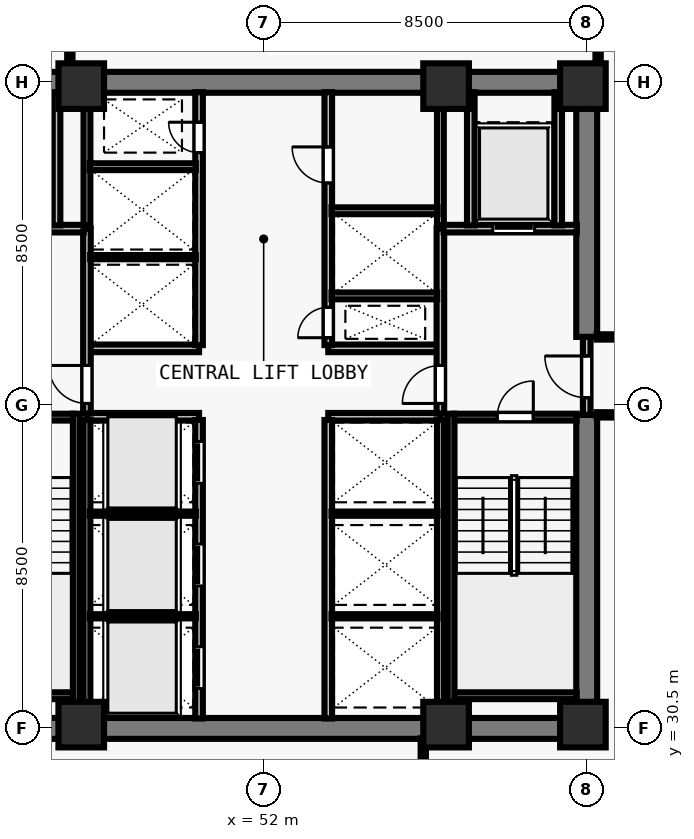
"""IFC4 building model, lengths in metres.
Left out: names, types, materials, properties, quantities, classifications, styles, units other than length and angle.
Written with IfcOpenShell. Run it as: python <this file> out.ifc"""

import sys

from ifc_helpers import new_model, si_unit, direction, frame, frame_2d, origin, origin_2d, place, context, subcontext, project, spatial, rectangle, extrude, element, fill, save


model = new_model("IFC4")
c1 = context("Model", 3, precision=1e-05, world=origin(), true_north=direction((0.0, 1.0)))
c2 = subcontext(c1, "Body", "Model", "MODEL_VIEW")
j1 = project(units=[si_unit("LENGTHUNIT", "METRE"), si_unit("PLANEANGLEUNIT", "RADIAN")], contexts=[c1])
p1 = place(None, origin())
s1 = spatial("IfcSite", under=j1, at=p1, CompositionType="ELEMENT")
p2 = place(p1, origin())
s2 = spatial("IfcBuilding", under=s1, at=p2, CompositionType="ELEMENT")
p3 = place(p2, frame((0.0, 0.0, 51.5)))
s3 = spatial("IfcBuildingStorey", under=s2, at=p3, CompositionType="ELEMENT", Elevation=51.5)
for number, where, z_axis, x_axis in (
    (1, (47.2, 30.6, 0.0), (0.0, 0.0, 1.0), (1.0, 0.0, 0.0)),
    (2, (56.8, 30.6, 0.0), (0.0, 0.0, 1.0), (1.0, 0.0, 0.0)),
    (3, (60.4, 30.6, 0.0), (0.0, 0.0, 1.0), (1.0, 0.0, 0.0)),
    (4, (47.2, 47.4, 0.0), (0.0, 0.0, 1.0), (1.0, 0.0, 0.0)),
    (5, (56.8, 47.4, 0.0), (0.0, 0.0, 1.0), (1.0, 0.0, 0.0)),
    (6, (60.4, 47.4, 0.0), (0.0, 0.0, 1.0), (1.0, 0.0, 0.0)),
):
    element("IfcColumn", number, at=place(p3, frame(where, z_axis=z_axis, x_axis=x_axis)), inside=s3, PredefinedType="COLUMN", context=c2, shape_type="SweptSolid", body=[
        extrude(rectangle(XDim=1.2, YDim=1.2, at=origin_2d()), origin(), (0.0, 0.0, 1.0), 3.5),
    ])
for number, where, z_axis, x_axis in (
    (7, (43.225, 30.5, 0.0), (0.0, 0.0, 1.0), (1.0, 0.0, 0.0)),
    (8, (43.225, 47.5, 0.0), (0.0, 0.0, 1.0), (1.0, 0.0, 0.0)),
):
    element("IfcWall", number, at=place(p3, frame(where, z_axis=z_axis, x_axis=x_axis)), inside=s3, PredefinedType="SHEAR", context=c2, shape_type="SweptSolid", body=[
        extrude(rectangle(XDim=17.55, YDim=0.55, at=frame_2d((8.775, 0.0))), origin(), (0.0, 0.0, 1.0), 3.28),
    ])
p4 = place(p3, frame((60.5, 30.765, 0.0), z_axis=(0.0, 0.0, 1.0), x_axis=(0.0, 1.0, 0.0)))
e9 = element("IfcWall", 9, at=p4, inside=s3, PredefinedType="SHEAR", context=c2, shape_type="SweptSolid", body=[
    extrude(rectangle(XDim=7.985, YDim=0.55, at=frame_2d((3.993, 0.0))), origin(), (0.0, 0.0, 1.0), 3.28),
])
p5 = place(p3, frame((60.5, 40.8, 0.0), z_axis=(0.0, 0.0, 1.0), x_axis=(0.0, 1.0, 0.0)))
e10 = element("IfcWall", 10, at=p5, inside=s3, PredefinedType="SHEAR", context=c2, shape_type="SweptSolid", body=[
    extrude(rectangle(XDim=6.435, YDim=0.55, at=frame_2d((3.218, 0.0))), origin(), (0.0, 0.0, 1.0), 3.28),
])
for number, where, z_axis, x_axis in (
    (11, (47.35, 38.7, 0.0), (0.0, 0.0, 1.0), (1.0, 0.0, 0.0)),
    (12, (47.35, 40.5, 0.0), (0.0, 0.0, 1.0), (1.0, 0.0, 0.0)),
    (13, (53.7, 38.7, 0.0), (0.0, 0.0, 1.0), (1.0, 0.0, 0.0)),
    (14, (53.7, 40.5, 0.0), (0.0, 0.0, 1.0), (1.0, 0.0, 0.0)),
):
    element("IfcWall", number, at=place(p3, frame(where, z_axis=z_axis, x_axis=x_axis)), inside=s3, PredefinedType="SOLIDWALL", context=c2, shape_type="SweptSolid", body=[
        extrude(rectangle(XDim=2.95, YDim=0.2, at=frame_2d((1.475, 0.0))), origin(), (0.0, 0.0, 1.0), 3.28),
    ])
p6 = place(p3, frame((50.3, 30.76, 0.0), z_axis=(0.0, 0.0, 1.0), x_axis=(0.0, 1.0, 0.0)))
e15 = element("IfcWall", 15, at=p6, inside=s3, PredefinedType="SOLIDWALL", context=c2, shape_type="SweptSolid", body=[
    extrude(rectangle(XDim=7.855, YDim=0.2, at=frame_2d((3.927, 0.0))), origin(), (0.0, 0.0, 1.0), 3.28),
])
p7 = place(p6, frame((0.79, 0.0, 0.0)))
e16 = element("IfcOpeningElement", 16, at=p7, cuts=e15, PredefinedType="OPENING", context=c2, shape_type="SweptSolid", body=[
    extrude(rectangle(XDim=1.1, YDim=2.2, at=frame_2d((0.55, 1.1))), frame((0.0, 0.11, 0.0), z_axis=(0.0, -1.0, 0.0), x_axis=(1.0, 0.0, 0.0)), (0.0, 0.0, 1.0), 0.22),
])
p8 = place(p6, frame((3.49, 0.0, 0.0)))
e17 = element("IfcOpeningElement", 17, at=p8, cuts=e15, PredefinedType="OPENING", context=c2, shape_type="SweptSolid", body=[
    extrude(rectangle(XDim=1.1, YDim=2.2, at=frame_2d((0.55, 1.1))), frame((0.0, 0.11, 0.0), z_axis=(0.0, -1.0, 0.0), x_axis=(1.0, 0.0, 0.0)), (0.0, 0.0, 1.0), 0.22),
])
p9 = place(p6, frame((6.19, 0.0, 0.0)))
e18 = element("IfcOpeningElement", 18, at=p9, cuts=e15, PredefinedType="OPENING", context=c2, shape_type="SweptSolid", body=[
    extrude(rectangle(XDim=1.1, YDim=2.2, at=frame_2d((0.55, 1.1))), frame((0.0, 0.11, 0.0), z_axis=(0.0, -1.0, 0.0), x_axis=(1.0, 0.0, 0.0)), (0.0, 0.0, 1.0), 0.22),
])
p10 = place(p3, frame((53.7, 30.76, 0.0), z_axis=(0.0, 0.0, 1.0), x_axis=(0.0, 1.0, 0.0)))
e19 = element("IfcWall", 19, at=p10, inside=s3, PredefinedType="SOLIDWALL", context=c2, shape_type="SweptSolid", body=[
    extrude(rectangle(XDim=7.855, YDim=0.2, at=frame_2d((3.927, 0.0))), origin(), (0.0, 0.0, 1.0), 3.28),
])
p11 = place(p3, frame((50.3, 40.585, 0.0), z_axis=(0.0, 0.0, 1.0), x_axis=(0.0, 1.0, 0.0)))
e20 = element("IfcWall", 20, at=p11, inside=s3, PredefinedType="SOLIDWALL", context=c2, shape_type="SweptSolid", body=[
    extrude(rectangle(XDim=6.655, YDim=0.2, at=frame_2d((3.328, 0.0))), origin(), (0.0, 0.0, 1.0), 3.28),
])
p12 = place(p11, frame((5.065, 0.0, 0.0)))
e21 = element("IfcOpeningElement", 21, at=p12, cuts=e20, PredefinedType="OPENING", context=c2, shape_type="SweptSolid", body=[
    extrude(rectangle(XDim=0.8, YDim=2.08, at=frame_2d((0.4, 1.04))), frame((0.0, 0.11, 0.0), z_axis=(0.0, -1.0, 0.0), x_axis=(1.0, 0.0, 0.0)), (0.0, 0.0, 1.0), 0.22),
])
p13 = place(p3, frame((53.7, 40.585, 0.0), z_axis=(0.0, 0.0, 1.0), x_axis=(0.0, 1.0, 0.0)))
e22 = element("IfcWall", 22, at=p13, inside=s3, PredefinedType="SOLIDWALL", context=c2, shape_type="SweptSolid", body=[
    extrude(rectangle(XDim=6.655, YDim=0.2, at=frame_2d((3.328, 0.0))), origin(), (0.0, 0.0, 1.0), 3.28),
])
p14 = place(p13, frame((0.195, 0.0, 0.0)))
e23 = element("IfcOpeningElement", 23, at=p14, cuts=e22, PredefinedType="OPENING", context=c2, shape_type="SweptSolid", body=[
    extrude(rectangle(XDim=0.8, YDim=2.08, at=frame_2d((0.4, 1.04))), frame((0.0, 0.11, 0.0), z_axis=(0.0, -1.0, 0.0), x_axis=(1.0, 0.0, 0.0)), (0.0, 0.0, 1.0), 0.22),
])
p15 = place(p13, frame((4.265, 0.0, 0.0)))
e24 = element("IfcOpeningElement", 24, at=p15, cuts=e22, PredefinedType="OPENING", context=c2, shape_type="SweptSolid", body=[
    extrude(rectangle(XDim=0.95, YDim=2.12, at=frame_2d((0.475, 1.06))), frame((0.0, 0.11, 0.0), z_axis=(0.0, -1.0, 0.0), x_axis=(1.0, 0.0, 0.0)), (0.0, 0.0, 1.0), 0.22),
])
p16 = place(p3, frame((47.35, 38.785, 0.0), z_axis=(0.0, 0.0, 1.0), x_axis=(0.0, 1.0, 0.0)))
e25 = element("IfcWall", 25, at=p16, inside=s3, PredefinedType="SOLIDWALL", context=c2, shape_type="SweptSolid", body=[
    extrude(rectangle(XDim=4.865, YDim=0.2, at=frame_2d((2.433, 0.0))), origin(), (0.0, 0.0, 1.0), 3.28),
])
p17 = place(p16, frame((0.265, 0.0, 0.0)))
e26 = element("IfcOpeningElement", 26, at=p17, cuts=e25, PredefinedType="OPENING", context=c2, shape_type="SweptSolid", body=[
    extrude(rectangle(XDim=1.0, YDim=2.15, at=frame_2d((0.5, 1.075))), frame((0.0, 0.11, 0.0), z_axis=(0.0, -1.0, 0.0), x_axis=(1.0, 0.0, 0.0)), (0.0, 0.0, 1.0), 0.22),
])
p18 = place(p3, frame((43.76, 43.65, 0.0), z_axis=(0.0, 0.0, 1.0), x_axis=(1.0, 0.0, 0.0)))
e27 = element("IfcWall", 27, at=p18, inside=s3, PredefinedType="SOLIDWALL", context=c2, shape_type="SweptSolid", body=[
    extrude(rectangle(XDim=3.505, YDim=0.2, at=frame_2d((1.752, 0.0))), origin(), (0.0, 0.0, 1.0), 3.28),
])
p19 = place(p18, frame((1.11, 0.0, 0.0)))
e28 = element("IfcOpeningElement", 28, at=p19, cuts=e27, PredefinedType="OPENING", context=c2, shape_type="SweptSolid", body=[
    extrude(rectangle(XDim=1.1, YDim=2.2, at=frame_2d((0.55, 1.1))), frame((0.0, 0.11, 0.0), z_axis=(0.0, -1.0, 0.0), x_axis=(1.0, 0.0, 0.0)), (0.0, 0.0, 1.0), 0.22),
])
p20 = place(p3, frame((46.55, 43.735, 0.0), z_axis=(0.0, 0.0, 1.0), x_axis=(0.0, 1.0, 0.0)))
e29 = element("IfcWall", 29, at=p20, inside=s3, PredefinedType="SOLIDWALL", context=c2, shape_type="SweptSolid", body=[
    extrude(rectangle(XDim=3.505, YDim=0.2, at=frame_2d((1.752, 0.0))), origin(), (0.0, 0.0, 1.0), 3.28),
])
p21 = place(p3, frame((60.5, 38.75, 0.0), z_axis=(0.0, 0.0, 1.0), x_axis=(0.0, 1.0, 0.0)))
e30 = element("IfcWall", 30, at=p21, inside=s3, PredefinedType="SOLIDWALL", context=c2, shape_type="SweptSolid", body=[
    extrude(rectangle(XDim=2.05, YDim=0.2, at=frame_2d((1.025, 0.0))), origin(), (0.0, 0.0, 1.0), 3.28),
])
p22 = place(p21, frame((0.45, 0.0, 0.0)))
e31 = element("IfcOpeningElement", 31, at=p22, cuts=e30, PredefinedType="OPENING", context=c2, shape_type="SweptSolid", body=[
    extrude(rectangle(XDim=1.1, YDim=2.15, at=frame_2d((0.55, 1.075))), frame((0.0, 0.11, 0.0), z_axis=(0.0, -1.0, 0.0), x_axis=(1.0, 0.0, 0.0)), (0.0, 0.0, 1.0), 0.22),
])
p23 = place(p3, frame((56.65, 38.785, 0.0), z_axis=(0.0, 0.0, 1.0), x_axis=(0.0, 1.0, 0.0)))
e32 = element("IfcWall", 32, at=p23, inside=s3, PredefinedType="SOLIDWALL", context=c2, shape_type="SweptSolid", body=[
    extrude(rectangle(XDim=4.865, YDim=0.2, at=frame_2d((2.433, 0.0))), origin(), (0.0, 0.0, 1.0), 3.28),
])
p24 = place(p23, frame((0.265, 0.0, 0.0)))
e33 = element("IfcOpeningElement", 33, at=p24, cuts=e32, PredefinedType="OPENING", context=c2, shape_type="SweptSolid", body=[
    extrude(rectangle(XDim=1.0, YDim=2.15, at=frame_2d((0.5, 1.075))), frame((0.0, 0.11, 0.0), z_axis=(0.0, -1.0, 0.0), x_axis=(1.0, 0.0, 0.0)), (0.0, 0.0, 1.0), 0.22),
])
p25 = place(p3, frame((56.735, 43.65, 0.0), z_axis=(0.0, 0.0, 1.0), x_axis=(1.0, 0.0, 0.0)))
e34 = element("IfcWall", 34, at=p25, inside=s3, PredefinedType="SOLIDWALL", context=c2, shape_type="SweptSolid", body=[
    extrude(rectangle(XDim=3.505, YDim=0.2, at=frame_2d((1.752, 0.0))), origin(), (0.0, 0.0, 1.0), 3.28),
])
p26 = place(p25, frame((1.295, 0.0, 0.0)))
e35 = element("IfcOpeningElement", 35, at=p26, cuts=e34, PredefinedType="OPENING", context=c2, shape_type="SweptSolid", body=[
    extrude(rectangle(XDim=1.1, YDim=2.2, at=frame_2d((0.55, 1.1))), frame((0.0, 0.11, 0.0), z_axis=(0.0, -1.0, 0.0), x_axis=(1.0, 0.0, 0.0)), (0.0, 0.0, 1.0), 0.22),
])
for number, where, z_axis, x_axis in (
    (36, (57.45, 43.735, 0.0), (0.0, 0.0, 1.0), (0.0, 1.0, 0.0)),
    (37, (59.75, 43.735, 0.0), (0.0, 0.0, 1.0), (0.0, 1.0, 0.0)),
):
    element("IfcWall", number, at=place(p3, frame(where, z_axis=z_axis, x_axis=x_axis)), inside=s3, PredefinedType="SOLIDWALL", context=c2, shape_type="SweptSolid", body=[
        extrude(rectangle(XDim=3.505, YDim=0.2, at=frame_2d((1.752, 0.0))), origin(), (0.0, 0.0, 1.0), 3.28),
    ])
p27 = place(p3, frame((47.35, 30.76, 0.0), z_axis=(0.0, 0.0, 1.0), x_axis=(0.0, 1.0, 0.0)))
e38 = element("IfcWall", 38, at=p27, inside=s3, PredefinedType="SOLIDWALL", context=c2, shape_type="SweptSolid", body=[
    extrude(rectangle(XDim=7.855, YDim=0.18, at=frame_2d((3.927, 0.0))), origin(), (0.0, 0.0, 1.0), 3.28),
])
for number, where, z_axis, x_axis in (
    (39, (47.425, 33.45, 0.0), (0.0, 0.0, 1.0), (1.0, 0.0, 0.0)),
    (40, (47.425, 36.15, 0.0), (0.0, 0.0, 1.0), (1.0, 0.0, 0.0)),
):
    element("IfcWall", number, at=place(p3, frame(where, z_axis=z_axis, x_axis=x_axis)), inside=s3, PredefinedType="PARTITIONING", context=c2, shape_type="SweptSolid", body=[
        extrude(rectangle(XDim=2.79, YDim=0.11, at=frame_2d((1.395, 0.0))), origin(), (0.0, 0.0, 1.0), 3.28),
    ])
p28 = place(p3, frame((56.65, 30.76, 0.0), z_axis=(0.0, 0.0, 1.0), x_axis=(0.0, 1.0, 0.0)))
e41 = element("IfcWall", 41, at=p28, inside=s3, PredefinedType="SOLIDWALL", context=c2, shape_type="SweptSolid", body=[
    extrude(rectangle(XDim=7.855, YDim=0.18, at=frame_2d((3.927, 0.0))), origin(), (0.0, 0.0, 1.0), 3.28),
])
for number, where, z_axis, x_axis in (
    (42, (53.785, 33.45, 0.0), (0.0, 0.0, 1.0), (1.0, 0.0, 0.0)),
    (43, (53.785, 36.15, 0.0), (0.0, 0.0, 1.0), (1.0, 0.0, 0.0)),
):
    element("IfcWall", number, at=place(p3, frame(where, z_axis=z_axis, x_axis=x_axis)), inside=s3, PredefinedType="PARTITIONING", context=c2, shape_type="SweptSolid", body=[
        extrude(rectangle(XDim=2.79, YDim=0.11, at=frame_2d((1.395, 0.0))), origin(), (0.0, 0.0, 1.0), 3.28),
    ])
p29 = place(p3, frame((47.35, 43.735, 0.0), z_axis=(0.0, 0.0, 1.0), x_axis=(0.0, 1.0, 0.0)))
e44 = element("IfcWall", 44, at=p29, inside=s3, PredefinedType="SOLIDWALL", context=c2, shape_type="SweptSolid", body=[
    extrude(rectangle(XDim=3.505, YDim=0.18, at=frame_2d((1.752, 0.0))), origin(), (0.0, 0.0, 1.0), 3.28),
])
p30 = place(p3, frame((47.435, 42.9, 0.0), z_axis=(0.0, 0.0, 1.0), x_axis=(1.0, 0.0, 0.0)))
e45 = element("IfcWall", 45, at=p30, inside=s3, PredefinedType="PARTITIONING", context=c2, shape_type="SweptSolid", body=[
    extrude(rectangle(XDim=2.78, YDim=0.11, at=frame_2d((1.39, 0.0))), origin(), (0.0, 0.0, 1.0), 3.28),
])
p31 = place(p3, frame((47.425, 45.28, 0.0), z_axis=(0.0, 0.0, 1.0), x_axis=(1.0, 0.0, 0.0)))
e46 = element("IfcWall", 46, at=p31, inside=s3, PredefinedType="SOLIDWALL", context=c2, shape_type="SweptSolid", body=[
    extrude(rectangle(XDim=2.79, YDim=0.18, at=frame_2d((1.395, 0.0))), origin(), (0.0, 0.0, 1.0), 3.28),
])
p32 = place(p3, frame((56.65, 43.735, 0.0), z_axis=(0.0, 0.0, 1.0), x_axis=(0.0, 1.0, 0.0)))
e47 = element("IfcWall", 47, at=p32, inside=s3, PredefinedType="SOLIDWALL", context=c2, shape_type="SweptSolid", body=[
    extrude(rectangle(XDim=3.505, YDim=0.18, at=frame_2d((1.752, 0.0))), origin(), (0.0, 0.0, 1.0), 3.28),
])
p33 = place(p3, frame((53.785, 41.88, 0.0), z_axis=(0.0, 0.0, 1.0), x_axis=(1.0, 0.0, 0.0)))
e48 = element("IfcWall", 48, at=p33, inside=s3, PredefinedType="SOLIDWALL", context=c2, shape_type="SweptSolid", body=[
    extrude(rectangle(XDim=2.78, YDim=0.18, at=frame_2d((1.39, 0.0))), origin(), (0.0, 0.0, 1.0), 3.28),
])
p34 = place(p3, frame((53.785, 44.12, 0.0), z_axis=(0.0, 0.0, 1.0), x_axis=(1.0, 0.0, 0.0)))
e49 = element("IfcWall", 49, at=p34, inside=s3, PredefinedType="SOLIDWALL", context=c2, shape_type="SweptSolid", body=[
    extrude(rectangle(XDim=2.79, YDim=0.18, at=frame_2d((1.395, 0.0))), origin(), (0.0, 0.0, 1.0), 3.28),
])
for number, where, z_axis, x_axis in (
    (50, (60.76, 38.75, 0.0), (0.0, 0.0, 1.0), (1.0, 0.0, 0.0)),
    (51, (60.76, 40.8, 0.0), (0.0, 0.0, 1.0), (1.0, 0.0, 0.0)),
):
    element("IfcWall", number, at=place(p3, frame(where, z_axis=z_axis, x_axis=x_axis)), inside=s3, PredefinedType="PARTITIONING", context=c2, shape_type="SweptSolid", body=[
        extrude(rectangle(XDim=4.385, YDim=0.14, at=frame_2d((2.192, 0.0))), origin(), (0.0, 0.0, 1.0), 3.28),
    ])
p35 = place(p3, frame((56.2, 25.555, 0.0), z_axis=(0.0, 0.0, 1.0), x_axis=(0.0, 1.0, 0.0)))
e52 = element("IfcWall", 52, at=p35, inside=s3, PredefinedType="PARTITIONING", context=c2, shape_type="SweptSolid", body=[
    extrude(rectangle(XDim=4.685, YDim=0.14, at=frame_2d((2.343, 0.0))), origin(), (0.0, 0.0, 1.0), 2.849),
])
p36 = place(p3, frame((46.9, 47.76, 0.0), z_axis=(0.0, 0.0, 1.0), x_axis=(0.0, 1.0, 0.0)))
e53 = element("IfcWall", 53, at=p36, inside=s3, PredefinedType="PARTITIONING", context=c2, shape_type="SweptSolid", body=[
    extrude(rectangle(XDim=4.685, YDim=0.14, at=frame_2d((2.343, 0.0))), origin(), (0.0, 0.0, 1.0), 3.28),
])
p37 = place(p3, frame((60.8, 47.76, 0.0), z_axis=(0.0, 0.0, 1.0), x_axis=(0.0, 1.0, 0.0)))
e54 = element("IfcWall", 54, at=p37, inside=s3, PredefinedType="PARTITIONING", context=c2, shape_type="SweptSolid", body=[
    extrude(rectangle(XDim=4.685, YDim=0.14, at=frame_2d((2.343, 0.0))), origin(), (0.0, 0.0, 1.0), 2.439),
])
p38 = place(p3, frame((43.765, 38.69, 0.0), z_axis=(0.0, 0.0, 1.0), x_axis=(1.0, 0.0, 0.0)))
e55 = element("IfcWall", 55, at=p38, inside=s3, PredefinedType="SOLIDWALL", context=c2, shape_type="SweptSolid", body=[
    extrude(rectangle(XDim=3.23, YDim=0.18, at=frame_2d((1.615, 0.0))), origin(), (0.0, 0.0, 1.0), 3.28),
])
p39 = place(p38, frame((1.14, 0.0, 0.0)))
e56 = element("IfcOpeningElement", 56, at=p39, cuts=e55, PredefinedType="OPENING", context=c2, shape_type="SweptSolid", body=[
    extrude(rectangle(XDim=0.95, YDim=2.15, at=frame_2d((0.475, 1.075))), frame((0.0, 0.1, 0.0), z_axis=(0.0, -1.0, 0.0), x_axis=(1.0, 0.0, 0.0)), (0.0, 0.0, 1.0), 0.2),
])
p40 = place(p3, frame((43.765, 31.36, 0.0), z_axis=(0.0, 0.0, 1.0), x_axis=(1.0, 0.0, 0.0)))
e57 = element("IfcWall", 57, at=p40, inside=s3, PredefinedType="SOLIDWALL", context=c2, shape_type="SweptSolid", body=[
    extrude(rectangle(XDim=3.23, YDim=0.18, at=frame_2d((1.615, 0.0))), origin(), (0.0, 0.0, 1.0), 3.28),
])
p41 = place(p3, frame((47.07, 38.78, 0.0), z_axis=(0.0, 0.0, 1.0), x_axis=(0.0, -1.0, 0.0)))
e58 = element("IfcWall", 58, at=p41, inside=s3, PredefinedType="SOLIDWALL", context=c2, shape_type="SweptSolid", body=[
    extrude(rectangle(XDim=8.017, YDim=0.18, at=frame_2d((4.009, 0.0))), origin(), (0.0, 0.0, 1.0), 3.28),
])
p42 = place(p3, frame((57.005, 38.69, 0.0), z_axis=(0.0, 0.0, 1.0), x_axis=(1.0, 0.0, 0.0)))
e59 = element("IfcWall", 59, at=p42, inside=s3, PredefinedType="SOLIDWALL", context=c2, shape_type="SweptSolid", body=[
    extrude(rectangle(XDim=3.23, YDim=0.18, at=frame_2d((1.615, 0.0))), origin(), (0.0, 0.0, 1.0), 3.28),
])
p43 = place(p42, frame((1.14, 0.0, 0.0)))
e60 = element("IfcOpeningElement", 60, at=p43, cuts=e59, PredefinedType="OPENING", context=c2, shape_type="SweptSolid", body=[
    extrude(rectangle(XDim=0.95, YDim=2.15, at=frame_2d((0.475, 1.075))), frame((0.0, 0.1, 0.0), z_axis=(0.0, -1.0, 0.0), x_axis=(1.0, 0.0, 0.0)), (0.0, 0.0, 1.0), 0.2),
])
p44 = place(p3, frame((57.005, 31.36, 0.0), z_axis=(0.0, 0.0, 1.0), x_axis=(1.0, 0.0, 0.0)))
e61 = element("IfcWall", 61, at=p44, inside=s3, PredefinedType="SOLIDWALL", context=c2, shape_type="SweptSolid", body=[
    extrude(rectangle(XDim=3.23, YDim=0.18, at=frame_2d((1.615, 0.0))), origin(), (0.0, 0.0, 1.0), 3.28),
])
p45 = place(p3, frame((56.93, 38.78, 0.0), z_axis=(0.0, 0.0, 1.0), x_axis=(0.0, -1.0, 0.0)))
e62 = element("IfcWall", 62, at=p45, inside=s3, PredefinedType="SOLIDWALL", context=c2, shape_type="SweptSolid", body=[
    extrude(rectangle(XDim=8.017, YDim=0.18, at=frame_2d((4.009, 0.0))), origin(), (0.0, 0.0, 1.0), 3.28),
])
p46 = place(p17, origin())
e63 = element("IfcDoor", 63, at=p46, inside=s3, OperationType="SINGLE_SWING_RIGHT", PredefinedType="DOOR", context=c2, shape_type="SweptSolid", body=[
    extrude(rectangle(XDim=1.0, YDim=2.15, at=frame_2d((0.5, 1.075))), frame((0.0, 0.025, 0.0), z_axis=(0.0, -1.0, 0.0), x_axis=(1.0, 0.0, 0.0)), (0.0, 0.0, 1.0), 0.05),
])
fill(e26, e63)
p47 = place(p22, origin())
e64 = element("IfcDoor", 64, at=p47, inside=s3, OperationType="SINGLE_SWING_RIGHT", PredefinedType="DOOR", context=c2, shape_type="SweptSolid", body=[
    extrude(rectangle(XDim=1.1, YDim=2.15, at=frame_2d((0.55, 1.075))), frame((0.0, 0.025, 0.0), z_axis=(0.0, -1.0, 0.0), x_axis=(1.0, 0.0, 0.0)), (0.0, 0.0, 1.0), 0.05),
])
fill(e31, e64)
p48 = place(p24, origin())
e65 = element("IfcDoor", 65, at=p48, inside=s3, OperationType="SINGLE_SWING_LEFT", PredefinedType="DOOR", context=c2, shape_type="SweptSolid", body=[
    extrude(rectangle(XDim=1.0, YDim=2.15, at=frame_2d((0.5, 1.075))), frame((0.0, 0.025, 0.0), z_axis=(0.0, -1.0, 0.0), x_axis=(1.0, 0.0, 0.0)), (0.0, 0.0, 1.0), 0.05),
])
fill(e33, e65)
p49 = place(p26, origin())
e66 = element("IfcDoor", 66, at=p49, inside=s3, OperationType="SLIDING_TO_LEFT", PredefinedType="DOOR", context=c2, shape_type="SweptSolid", body=[
    extrude(rectangle(XDim=1.1, YDim=2.2, at=frame_2d((0.55, 1.1))), frame((0.0, 0.025, 0.0), z_axis=(0.0, -1.0, 0.0), x_axis=(1.0, 0.0, 0.0)), (0.0, 0.0, 1.0), 0.05),
])
fill(e35, e66)
p50 = place(p7, origin())
e67 = element("IfcDoor", 67, at=p50, inside=s3, OperationType="SLIDING_TO_LEFT", PredefinedType="DOOR", context=c2, shape_type="SweptSolid", body=[
    extrude(rectangle(XDim=1.1, YDim=2.2, at=frame_2d((0.55, 1.1))), frame((0.0, 0.025, 0.0), z_axis=(0.0, -1.0, 0.0), x_axis=(1.0, 0.0, 0.0)), (0.0, 0.0, 1.0), 0.05),
])
fill(e16, e67)
p51 = place(p8, origin())
e68 = element("IfcDoor", 68, at=p51, inside=s3, OperationType="SLIDING_TO_LEFT", PredefinedType="DOOR", context=c2, shape_type="SweptSolid", body=[
    extrude(rectangle(XDim=1.1, YDim=2.2, at=frame_2d((0.55, 1.1))), frame((0.0, 0.025, 0.0), z_axis=(0.0, -1.0, 0.0), x_axis=(1.0, 0.0, 0.0)), (0.0, 0.0, 1.0), 0.05),
])
fill(e17, e68)
p52 = place(p9, origin())
e69 = element("IfcDoor", 69, at=p52, inside=s3, OperationType="SLIDING_TO_LEFT", PredefinedType="DOOR", context=c2, shape_type="SweptSolid", body=[
    extrude(rectangle(XDim=1.1, YDim=2.2, at=frame_2d((0.55, 1.1))), frame((0.0, 0.025, 0.0), z_axis=(0.0, -1.0, 0.0), x_axis=(1.0, 0.0, 0.0)), (0.0, 0.0, 1.0), 0.05),
])
fill(e18, e69)
p53 = place(p12, origin())
e70 = element("IfcDoor", 70, at=p53, inside=s3, OperationType="SINGLE_SWING_RIGHT", PredefinedType="DOOR", context=c2, shape_type="SweptSolid", body=[
    extrude(rectangle(XDim=0.8, YDim=2.08, at=frame_2d((0.4, 1.04))), frame((0.0, 0.025, 0.0), z_axis=(0.0, -1.0, 0.0), x_axis=(1.0, 0.0, 0.0)), (0.0, 0.0, 1.0), 0.05),
])
fill(e21, e70)
p54 = place(p14, origin())
e71 = element("IfcDoor", 71, at=p54, inside=s3, OperationType="SINGLE_SWING_LEFT", PredefinedType="DOOR", context=c2, shape_type="SweptSolid", body=[
    extrude(rectangle(XDim=0.8, YDim=2.08, at=frame_2d((0.4, 1.04))), frame((0.0, 0.025, 0.0), z_axis=(0.0, -1.0, 0.0), x_axis=(1.0, 0.0, 0.0)), (0.0, 0.0, 1.0), 0.05),
])
fill(e23, e71)
p55 = place(p15, origin())
e72 = element("IfcDoor", 72, at=p55, inside=s3, OperationType="SINGLE_SWING_RIGHT", PredefinedType="DOOR", context=c2, shape_type="SweptSolid", body=[
    extrude(rectangle(XDim=0.95, YDim=2.12, at=frame_2d((0.475, 1.06))), frame((0.0, 0.025, 0.0), z_axis=(0.0, -1.0, 0.0), x_axis=(1.0, 0.0, 0.0)), (0.0, 0.0, 1.0), 0.05),
])
fill(e24, e72)
p56 = place(p43, origin())
e73 = element("IfcDoor", 73, at=p56, inside=s3, OperationType="SINGLE_SWING_RIGHT", PredefinedType="DOOR", context=c2, shape_type="SweptSolid", body=[
    extrude(rectangle(XDim=0.95, YDim=2.15, at=frame_2d((0.475, 1.075))), frame((0.0, 0.025, 0.0), z_axis=(0.0, -1.0, 0.0), x_axis=(1.0, 0.0, 0.0)), (0.0, 0.0, 1.0), 0.05),
])
fill(e60, e73)
save(model, sys.argv[1])
